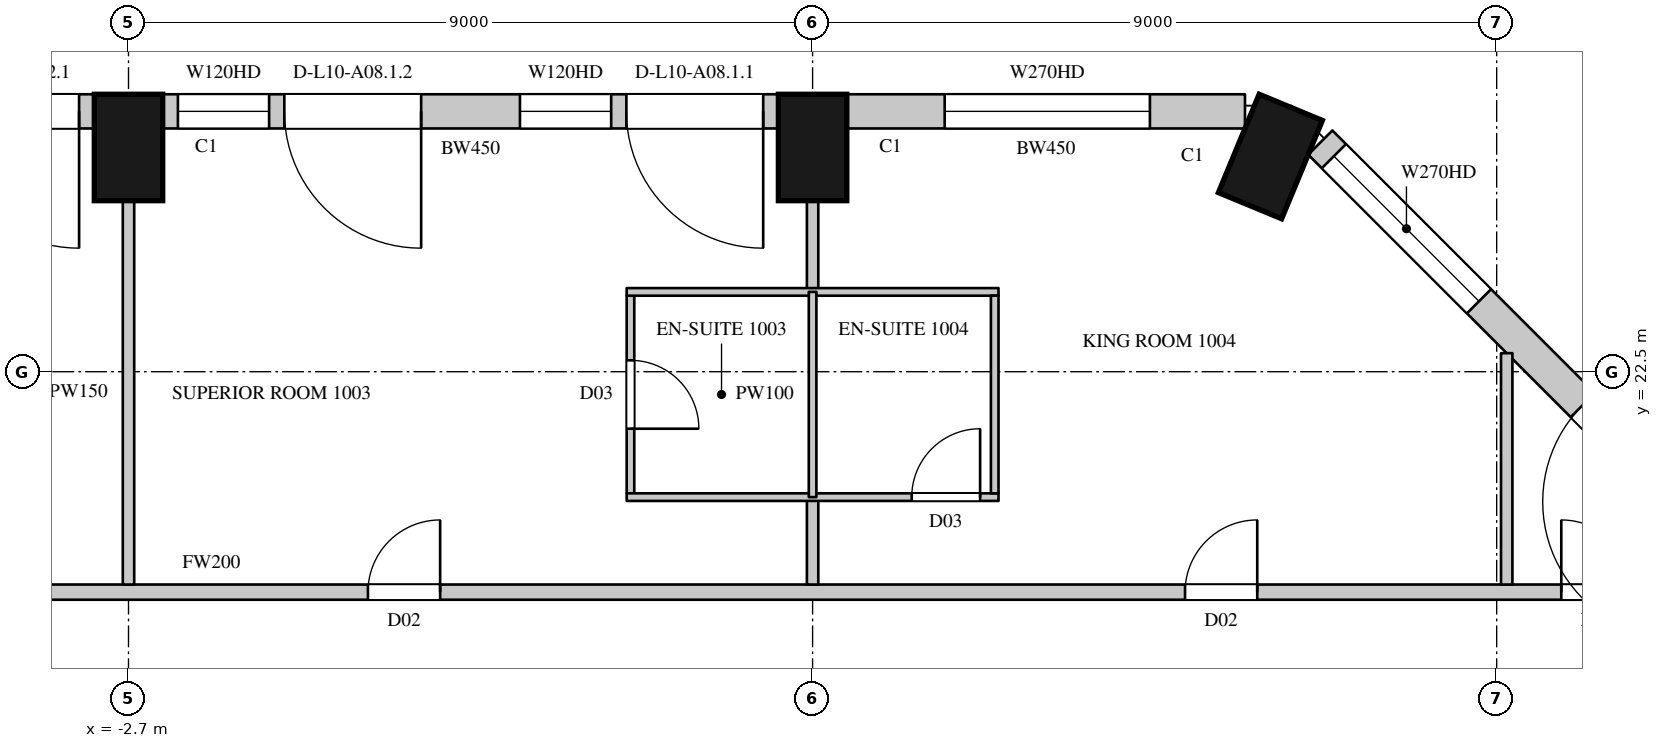
"""IFC4 building model, lengths in metres.
Left out: names, types, materials, properties, quantities, classifications, styles, units other than length and angle.
Written with IfcOpenShell. Run it as: python <this file> out.ifc"""

import sys

from ifc_helpers import new_model, si_unit, direction, frame, frame_2d, origin, origin_2d, place, context, subcontext, project, spatial, rectangle, extrude, element, fill, save


model = new_model("IFC4")
c1 = context("Model", 3, precision=1e-05, world=origin(), true_north=direction((0.0, 1.0)))
c2 = subcontext(c1, "Body", "Model", "MODEL_VIEW")
j1 = project(units=[si_unit("LENGTHUNIT", "METRE"), si_unit("PLANEANGLEUNIT", "RADIAN")], contexts=[c1])
p1 = place(None, origin())
s1 = spatial("IfcSite", under=j1, at=p1, CompositionType="ELEMENT")
p2 = place(p1, origin())
s2 = spatial("IfcBuilding", under=s1, at=p2, CompositionType="ELEMENT")
p3 = place(p2, frame((0.0, 0.0, 66.3)))
s3 = spatial("IfcBuildingStorey", under=s2, at=p3, CompositionType="ELEMENT", Elevation=66.3)
for number, where, z_axis, x_axis in (
    (1, (12.323, 25.331, 0.0), (0.0, 0.0, 1.0), (-0.924, 0.383, 0.0)),
    (2, (6.3, 25.45, 0.0), (0.0, 0.0, 1.0), (-1.0, 0.0, 0.0)),
    (3, (-2.7, 25.45, 0.0), (0.0, 0.0, 1.0), (-1.0, 0.0, 0.0)),
):
    element("IfcColumn", number, at=place(p3, frame(where, z_axis=z_axis, x_axis=x_axis)), inside=s3, PredefinedType="COLUMN", context=c2, shape_type="SweptSolid", body=[
        extrude(rectangle(XDim=0.9, YDim=1.4, at=origin_2d()), origin(), (0.0, 0.0, 1.0), 3.6),
    ])
p4 = place(p3, frame((18.229, 20.265, 0.0), z_axis=(0.0, 0.0, 1.0), x_axis=(-0.707106781187, 0.707106781187, 0.0)))
e4 = element("IfcWall", 4, at=p4, inside=s3, PredefinedType="SOLIDWALL", context=c2, shape_type="SweptSolid", body=[
    extrude(rectangle(XDim=7.424, YDim=0.45, at=frame_2d((3.712, 0.0))), origin(), (0.0, 0.0, 1.0), 3.3),
])
p5 = place(p4, frame((0.74, 0.0, 0.0)))
e5 = element("IfcOpeningElement", 5, at=p5, cuts=e4, PredefinedType="OPENING", context=c2, shape_type="SweptSolid", body=[
    extrude(rectangle(XDim=1.8, YDim=2.4, at=frame_2d((0.9, 1.2))), frame((0.0, 0.235, 0.0), z_axis=(0.0, -1.0, 0.0), x_axis=(1.0, 0.0, 0.0)), (0.0, 0.0, 1.0), 0.47),
])
p6 = place(p4, frame((4.471, 0.0, 1.05)))
e6 = element("IfcOpeningElement", 6, at=p6, cuts=e4, PredefinedType="OPENING", context=c2, shape_type="SweptSolid", body=[
    extrude(rectangle(XDim=2.7, YDim=2.0, at=frame_2d((1.35, 1.0))), frame((0.0, 0.235, 0.0), z_axis=(0.0, -1.0, 0.0), x_axis=(1.0, 0.0, 0.0)), (0.0, 0.0, 1.0), 0.47),
])
p7 = place(p3, frame((11.989, 25.925, 0.0), z_axis=(0.0, 0.0, 1.0), x_axis=(-1.0, 0.0, 0.0)))
e7 = element("IfcWall", 7, at=p7, inside=s3, PredefinedType="SOLIDWALL", context=c2, shape_type="SweptSolid", body=[
    extrude(rectangle(XDim=5.239, YDim=0.45, at=frame_2d((2.619, 0.0))), origin(), (0.0, 0.0, 1.0), 3.3),
])
p8 = place(p7, frame((1.251, 0.0, 1.05)))
e8 = element("IfcOpeningElement", 8, at=p8, cuts=e7, PredefinedType="OPENING", context=c2, shape_type="SweptSolid", body=[
    extrude(rectangle(XDim=2.7, YDim=2.0, at=frame_2d((1.35, 1.0))), frame((0.0, 0.235, 0.0), z_axis=(0.0, -1.0, 0.0), x_axis=(1.0, 0.0, 0.0)), (0.0, 0.0, 1.0), 0.47),
])
p9 = place(p3, frame((5.85, 25.925, 0.0), z_axis=(0.0, 0.0, 1.0), x_axis=(-1.0, 0.0, 0.0)))
e9 = element("IfcWall", 9, at=p9, inside=s3, PredefinedType="SOLIDWALL", context=c2, shape_type="SweptSolid", body=[
    extrude(rectangle(XDim=8.1, YDim=0.45, at=frame_2d((4.05, 0.0))), origin(), (0.0, 0.0, 1.0), 3.3),
])
p10 = place(p9, frame((0.2, 0.0, 0.0)))
e10 = element("IfcOpeningElement", 10, at=p10, cuts=e9, PredefinedType="OPENING", context=c2, shape_type="SweptSolid", body=[
    extrude(rectangle(XDim=1.8, YDim=2.4, at=frame_2d((0.9, 1.2))), frame((0.0, 0.235, 0.0), z_axis=(0.0, -1.0, 0.0), x_axis=(1.0, 0.0, 0.0)), (0.0, 0.0, 1.0), 0.47),
])
p11 = place(p9, frame((2.2, 0.0, 1.05)))
e11 = element("IfcOpeningElement", 11, at=p11, cuts=e9, PredefinedType="OPENING", context=c2, shape_type="SweptSolid", body=[
    extrude(rectangle(XDim=1.2, YDim=2.0, at=frame_2d((0.6, 1.0))), frame((0.0, 0.235, 0.0), z_axis=(0.0, -1.0, 0.0), x_axis=(1.0, 0.0, 0.0)), (0.0, 0.0, 1.0), 0.47),
])
p12 = place(p9, frame((4.7, 0.0, 0.0)))
e12 = element("IfcOpeningElement", 12, at=p12, cuts=e9, PredefinedType="OPENING", context=c2, shape_type="SweptSolid", body=[
    extrude(rectangle(XDim=1.8, YDim=2.4, at=frame_2d((0.9, 1.2))), frame((0.0, 0.235, 0.0), z_axis=(0.0, -1.0, 0.0), x_axis=(1.0, 0.0, 0.0)), (0.0, 0.0, 1.0), 0.47),
])
p13 = place(p9, frame((6.7, 0.0, 1.05)))
e13 = element("IfcOpeningElement", 13, at=p13, cuts=e9, PredefinedType="OPENING", context=c2, shape_type="SweptSolid", body=[
    extrude(rectangle(XDim=1.2, YDim=2.0, at=frame_2d((0.6, 1.0))), frame((0.0, 0.235, 0.0), z_axis=(0.0, -1.0, 0.0), x_axis=(1.0, 0.0, 0.0)), (0.0, 0.0, 1.0), 0.47),
])
p14 = place(p3, frame((-3.15, 25.925, 0.0), z_axis=(0.0, 0.0, 1.0), x_axis=(-1.0, 0.0, 0.0)))
e14 = element("IfcWall", 14, at=p14, inside=s3, PredefinedType="SOLIDWALL", context=c2, shape_type="SweptSolid", body=[
    extrude(rectangle(XDim=8.1, YDim=0.45, at=frame_2d((4.05, 0.0))), origin(), (0.0, 0.0, 1.0), 3.3),
])
p15 = place(p14, frame((0.2, 0.0, 0.0)))
e15 = element("IfcOpeningElement", 15, at=p15, cuts=e14, PredefinedType="OPENING", context=c2, shape_type="SweptSolid", body=[
    extrude(rectangle(XDim=1.8, YDim=2.4, at=frame_2d((0.9, 1.2))), frame((0.0, 0.235, 0.0), z_axis=(0.0, -1.0, 0.0), x_axis=(1.0, 0.0, 0.0)), (0.0, 0.0, 1.0), 0.47),
])
p16 = place(p14, frame((2.2, 0.0, 1.05)))
e16 = element("IfcOpeningElement", 16, at=p16, cuts=e14, PredefinedType="OPENING", context=c2, shape_type="SweptSolid", body=[
    extrude(rectangle(XDim=1.2, YDim=2.0, at=frame_2d((0.6, 1.0))), frame((0.0, 0.235, 0.0), z_axis=(0.0, -1.0, 0.0), x_axis=(1.0, 0.0, 0.0)), (0.0, 0.0, 1.0), 0.47),
])
p17 = place(p14, frame((4.7, 0.0, 0.0)))
e17 = element("IfcOpeningElement", 17, at=p17, cuts=e14, PredefinedType="OPENING", context=c2, shape_type="SweptSolid", body=[
    extrude(rectangle(XDim=1.8, YDim=2.4, at=frame_2d((0.9, 1.2))), frame((0.0, 0.235, 0.0), z_axis=(0.0, -1.0, 0.0), x_axis=(1.0, 0.0, 0.0)), (0.0, 0.0, 1.0), 0.47),
])
p18 = place(p14, frame((6.7, 0.0, 1.05)))
e18 = element("IfcOpeningElement", 18, at=p18, cuts=e14, PredefinedType="OPENING", context=c2, shape_type="SweptSolid", body=[
    extrude(rectangle(XDim=1.2, YDim=2.0, at=frame_2d((0.6, 1.0))), frame((0.0, 0.235, 0.0), z_axis=(0.0, -1.0, 0.0), x_axis=(1.0, 0.0, 0.0)), (0.0, 0.0, 1.0), 0.47),
])
p19 = place(p3, frame((16.486, 23.529, 0.0), z_axis=(0.0, 0.0, 1.0), x_axis=(-0.707022305137, 0.707191247145, 0.0)))
e19 = element("IfcWall", 19, at=p19, inside=s3, PredefinedType="SOLIDWALL", context=c2, shape_type="SweptSolid", body=[
    extrude(rectangle(XDim=1.445, YDim=0.45, at=frame_2d((0.723, 0.0))), origin(), (0.0, 0.0, 1.0), 0.6),
])
p20 = place(p3, frame((-20.7, 19.6, 0.0), z_axis=(0.0, 0.0, 1.0), x_axis=(1.0, 0.0, 0.0)))
e20 = element("IfcWall", 20, at=p20, inside=s3, PredefinedType="PARTITIONING", context=c2, shape_type="SweptSolid", body=[
    extrude(rectangle(XDim=38.184, YDim=0.2, at=frame_2d((19.092, 0.0))), origin(), (0.0, 0.0, 1.0), 3.3),
])
p21 = place(p20, frame((3.15, 0.0, 0.0)))
e21 = element("IfcOpeningElement", 21, at=p21, cuts=e20, PredefinedType="OPENING", context=c2, shape_type="SweptSolid", body=[
    extrude(rectangle(XDim=0.95, YDim=2.2, at=frame_2d((0.475, 1.1))), frame((0.0, 0.11, 0.0), z_axis=(0.0, -1.0, 0.0), x_axis=(1.0, 0.0, 0.0)), (0.0, 0.0, 1.0), 0.22),
])
p22 = place(p20, frame((13.9, 0.0, 0.0)))
e22 = element("IfcOpeningElement", 22, at=p22, cuts=e20, PredefinedType="OPENING", context=c2, shape_type="SweptSolid", body=[
    extrude(rectangle(XDim=0.95, YDim=2.2, at=frame_2d((0.475, 1.1))), frame((0.0, 0.11, 0.0), z_axis=(0.0, -1.0, 0.0), x_axis=(1.0, 0.0, 0.0)), (0.0, 0.0, 1.0), 0.22),
])
p23 = place(p20, frame((21.15, 0.0, 0.0)))
e23 = element("IfcOpeningElement", 23, at=p23, cuts=e20, PredefinedType="OPENING", context=c2, shape_type="SweptSolid", body=[
    extrude(rectangle(XDim=0.95, YDim=2.2, at=frame_2d((0.475, 1.1))), frame((0.0, 0.11, 0.0), z_axis=(0.0, -1.0, 0.0), x_axis=(1.0, 0.0, 0.0)), (0.0, 0.0, 1.0), 0.22),
])
p24 = place(p20, frame((31.9, 0.0, 0.0)))
e24 = element("IfcOpeningElement", 24, at=p24, cuts=e20, PredefinedType="OPENING", context=c2, shape_type="SweptSolid", body=[
    extrude(rectangle(XDim=0.95, YDim=2.2, at=frame_2d((0.475, 1.1))), frame((0.0, 0.11, 0.0), z_axis=(0.0, -1.0, 0.0), x_axis=(1.0, 0.0, 0.0)), (0.0, 0.0, 1.0), 0.22),
])
p25 = place(p20, frame((36.85, 0.0, 0.0)))
e25 = element("IfcOpeningElement", 25, at=p25, cuts=e20, PredefinedType="OPENING", context=c2, shape_type="SweptSolid", body=[
    extrude(rectangle(XDim=0.95, YDim=2.2, at=frame_2d((0.475, 1.1))), frame((0.0, 0.11, 0.0), z_axis=(0.0, -1.0, 0.0), x_axis=(1.0, 0.0, 0.0)), (0.0, 0.0, 1.0), 0.22),
])
p26 = place(p3, frame((-2.7, 19.7, 0.0), z_axis=(0.0, 0.0, 1.0), x_axis=(0.0, 1.0, 0.0)))
e26 = element("IfcWall", 26, at=p26, inside=s3, PredefinedType="PARTITIONING", context=c2, shape_type="SweptSolid", body=[
    extrude(rectangle(XDim=5.05, YDim=0.15, at=frame_2d((2.525, 0.0))), origin(), (0.0, 0.0, 1.0), 2.75),
])
p27 = place(p3, frame((6.3, 19.7, 0.0), z_axis=(0.0, 0.0, 1.0), x_axis=(0.0, 1.0, 0.0)))
e27 = element("IfcWall", 27, at=p27, inside=s3, PredefinedType="PARTITIONING", context=c2, shape_type="SweptSolid", body=[
    extrude(rectangle(XDim=1.15, YDim=0.15, at=frame_2d((0.575, 0.0))), origin(), (0.0, 0.0, 1.0), 2.75),
])
p28 = place(p3, frame((6.3, 23.55, 0.0), z_axis=(0.0, 0.0, 1.0), x_axis=(0.0, 1.0, 0.0)))
e28 = element("IfcWall", 28, at=p28, inside=s3, PredefinedType="PARTITIONING", context=c2, shape_type="SweptSolid", body=[
    extrude(rectangle(XDim=1.2, YDim=0.15, at=frame_2d((0.6, 0.0))), origin(), (0.0, 0.0, 1.0), 2.75),
])
p29 = place(p3, frame((15.432, 19.7, 0.0), z_axis=(0.0, 0.0, 1.0), x_axis=(0.0, 1.0, 0.0)))
e29 = element("IfcWall", 29, at=p29, inside=s3, PredefinedType="PARTITIONING", context=c2, shape_type="SweptSolid", body=[
    extrude(rectangle(XDim=3.044, YDim=0.15, at=frame_2d((1.522, 0.0))), origin(), (0.0, 0.0, 1.0), 3.3),
])
p30 = place(p3, frame((3.904, 20.9, 0.0), z_axis=(0.0, 0.0, 1.0), x_axis=(0.0, 1.0, 0.0)))
e30 = element("IfcWall", 30, at=p30, inside=s3, PredefinedType="PARTITIONING", context=c2, shape_type="SweptSolid", body=[
    extrude(rectangle(XDim=2.6, YDim=0.1, at=frame_2d((1.3, 0.0))), origin(), (0.0, 0.0, 1.0), 3.3),
])
p31 = place(p30, frame((0.85, 0.0, 0.0)))
e31 = element("IfcOpeningElement", 31, at=p31, cuts=e30, PredefinedType="OPENING", context=c2, shape_type="SweptSolid", body=[
    extrude(rectangle(XDim=0.9, YDim=2.2, at=frame_2d((0.45, 1.1))), frame((0.0, 0.06, 0.0), z_axis=(0.0, -1.0, 0.0), x_axis=(1.0, 0.0, 0.0)), (0.0, 0.0, 1.0), 0.12),
])
p32 = place(p3, frame((3.854, 20.85, 0.0), z_axis=(0.0, 0.0, 1.0), x_axis=(1.0, 0.0, 0.0)))
e32 = element("IfcWall", 32, at=p32, inside=s3, PredefinedType="PARTITIONING", context=c2, shape_type="SweptSolid", body=[
    extrude(rectangle(XDim=4.892, YDim=0.1, at=frame_2d((2.446, 0.0))), origin(), (0.0, 0.0, 1.0), 3.3),
])
p33 = place(p32, frame((3.75, 0.0, 0.0)))
e33 = element("IfcOpeningElement", 33, at=p33, cuts=e32, PredefinedType="OPENING", context=c2, shape_type="SweptSolid", body=[
    extrude(rectangle(XDim=0.9, YDim=2.2, at=frame_2d((0.45, 1.1))), frame((0.0, 0.06, 0.0), z_axis=(0.0, -1.0, 0.0), x_axis=(1.0, 0.0, 0.0)), (0.0, 0.0, 1.0), 0.12),
])
p34 = place(p3, frame((3.854, 23.55, 0.0), z_axis=(0.0, 0.0, 1.0), x_axis=(1.0, 0.0, 0.0)))
e34 = element("IfcWall", 34, at=p34, inside=s3, PredefinedType="PARTITIONING", context=c2, shape_type="SweptSolid", body=[
    extrude(rectangle(XDim=4.892, YDim=0.1, at=frame_2d((2.446, 0.0))), origin(), (0.0, 0.0, 1.0), 3.3),
])
p35 = place(p3, frame((6.3, 20.85, 0.0), z_axis=(0.0, 0.0, 1.0), x_axis=(0.0, 1.0, 0.0)))
e35 = element("IfcWall", 35, at=p35, inside=s3, PredefinedType="PARTITIONING", context=c2, shape_type="SweptSolid", body=[
    extrude(rectangle(XDim=2.7, YDim=0.1, at=frame_2d((1.35, 0.0))), origin(), (0.0, 0.0, 1.0), 2.75),
])
p36 = place(p3, frame((8.696, 20.9, 0.0), z_axis=(0.0, 0.0, 1.0), x_axis=(0.0, 1.0, 0.0)))
e36 = element("IfcWall", 36, at=p36, inside=s3, PredefinedType="PARTITIONING", context=c2, shape_type="SweptSolid", body=[
    extrude(rectangle(XDim=2.6, YDim=0.1, at=frame_2d((1.3, 0.0))), origin(), (0.0, 0.0, 1.0), 3.3),
])
p37 = place(p5, origin())
e37 = element("IfcDoor", 37, at=p37, inside=s3, OperationType="SLIDING_TO_LEFT", PredefinedType="DOOR", context=c2, shape_type="SweptSolid", body=[
    extrude(rectangle(XDim=1.8, YDim=2.4, at=frame_2d((0.9, 1.2))), frame((0.0, 0.13, 0.0), z_axis=(0.0, -1.0, 0.0), x_axis=(1.0, 0.0, 0.0)), (0.0, 0.0, 1.0), 0.05),
])
fill(e5, e37)
p38 = place(p6, origin())
e38 = element("IfcWindow", 38, at=p38, inside=s3, PartitioningType="SINGLE_PANEL", PredefinedType="WINDOW", context=c2, shape_type="SweptSolid", body=[
    extrude(rectangle(XDim=2.7, YDim=2.0, at=frame_2d((1.35, 1.0))), frame((0.0, 0.135, 0.0), z_axis=(0.0, -1.0, 0.0), x_axis=(1.0, 0.0, 0.0)), (0.0, 0.0, 1.0), 0.06),
])
fill(e6, e38)
p39 = place(p8, origin())
e39 = element("IfcWindow", 39, at=p39, inside=s3, PartitioningType="SINGLE_PANEL", PredefinedType="WINDOW", context=c2, shape_type="SweptSolid", body=[
    extrude(rectangle(XDim=2.7, YDim=2.0, at=frame_2d((1.35, 1.0))), frame((0.0, 0.135, 0.0), z_axis=(0.0, -1.0, 0.0), x_axis=(1.0, 0.0, 0.0)), (0.0, 0.0, 1.0), 0.06),
])
fill(e8, e39)
p40 = place(p10, origin())
e40 = element("IfcDoor", 40, at=p40, inside=s3, OperationType="SLIDING_TO_LEFT", PredefinedType="DOOR", context=c2, shape_type="SweptSolid", body=[
    extrude(rectangle(XDim=1.8, YDim=2.4, at=frame_2d((0.9, 1.2))), frame((0.0, 0.13, 0.0), z_axis=(0.0, -1.0, 0.0), x_axis=(1.0, 0.0, 0.0)), (0.0, 0.0, 1.0), 0.05),
])
fill(e10, e40)
p41 = place(p11, origin())
e41 = element("IfcWindow", 41, at=p41, inside=s3, PartitioningType="SINGLE_PANEL", PredefinedType="WINDOW", context=c2, shape_type="SweptSolid", body=[
    extrude(rectangle(XDim=1.2, YDim=2.0, at=frame_2d((0.6, 1.0))), frame((0.0, 0.135, 0.0), z_axis=(0.0, -1.0, 0.0), x_axis=(1.0, 0.0, 0.0)), (0.0, 0.0, 1.0), 0.06),
])
fill(e11, e41)
p42 = place(p12, origin())
e42 = element("IfcDoor", 42, at=p42, inside=s3, OperationType="SLIDING_TO_LEFT", PredefinedType="DOOR", context=c2, shape_type="SweptSolid", body=[
    extrude(rectangle(XDim=1.8, YDim=2.4, at=frame_2d((0.9, 1.2))), frame((0.0, 0.13, 0.0), z_axis=(0.0, -1.0, 0.0), x_axis=(1.0, 0.0, 0.0)), (0.0, 0.0, 1.0), 0.05),
])
fill(e12, e42)
p43 = place(p13, origin())
e43 = element("IfcWindow", 43, at=p43, inside=s3, PartitioningType="SINGLE_PANEL", PredefinedType="WINDOW", context=c2, shape_type="SweptSolid", body=[
    extrude(rectangle(XDim=1.2, YDim=2.0, at=frame_2d((0.6, 1.0))), frame((0.0, 0.135, 0.0), z_axis=(0.0, -1.0, 0.0), x_axis=(1.0, 0.0, 0.0)), (0.0, 0.0, 1.0), 0.06),
])
fill(e13, e43)
p44 = place(p15, origin())
e44 = element("IfcDoor", 44, at=p44, inside=s3, OperationType="SLIDING_TO_LEFT", PredefinedType="DOOR", context=c2, shape_type="SweptSolid", body=[
    extrude(rectangle(XDim=1.8, YDim=2.4, at=frame_2d((0.9, 1.2))), frame((0.0, 0.13, 0.0), z_axis=(0.0, -1.0, 0.0), x_axis=(1.0, 0.0, 0.0)), (0.0, 0.0, 1.0), 0.05),
])
fill(e15, e44)
p45 = place(p23, origin())
e45 = element("IfcDoor", 45, at=p45, inside=s3, OperationType="SINGLE_SWING_RIGHT", PredefinedType="DOOR", context=c2, shape_type="SweptSolid", body=[
    extrude(rectangle(XDim=0.95, YDim=2.2, at=frame_2d((0.475, 1.1))), frame((0.0, 0.025, 0.0), z_axis=(0.0, -1.0, 0.0), x_axis=(1.0, 0.0, 0.0)), (0.0, 0.0, 1.0), 0.05),
])
fill(e23, e45)
p46 = place(p31, origin())
e46 = element("IfcDoor", 46, at=p46, inside=s3, OperationType="SINGLE_SWING_RIGHT", PredefinedType="DOOR", context=c2, shape_type="SweptSolid", body=[
    extrude(rectangle(XDim=0.9, YDim=2.2, at=frame_2d((0.45, 1.1))), frame((0.0, 0.025, 0.0), z_axis=(0.0, -1.0, 0.0), x_axis=(1.0, 0.0, 0.0)), (0.0, 0.0, 1.0), 0.05),
])
fill(e31, e46)
p47 = place(p24, origin())
e47 = element("IfcDoor", 47, at=p47, inside=s3, OperationType="SINGLE_SWING_RIGHT", PredefinedType="DOOR", context=c2, shape_type="SweptSolid", body=[
    extrude(rectangle(XDim=0.95, YDim=2.2, at=frame_2d((0.475, 1.1))), frame((0.0, 0.025, 0.0), z_axis=(0.0, -1.0, 0.0), x_axis=(1.0, 0.0, 0.0)), (0.0, 0.0, 1.0), 0.05),
])
fill(e24, e47)
p48 = place(p33, origin())
e48 = element("IfcDoor", 48, at=p48, inside=s3, OperationType="SINGLE_SWING_RIGHT", PredefinedType="DOOR", context=c2, shape_type="SweptSolid", body=[
    extrude(rectangle(XDim=0.9, YDim=2.2, at=frame_2d((0.45, 1.1))), frame((0.0, 0.025, 0.0), z_axis=(0.0, -1.0, 0.0), x_axis=(1.0, 0.0, 0.0)), (0.0, 0.0, 1.0), 0.05),
])
fill(e33, e48)
p49 = place(p25, origin())
e49 = element("IfcDoor", 49, at=p49, inside=s3, OperationType="SINGLE_SWING_LEFT", PredefinedType="DOOR", context=c2, shape_type="SweptSolid", body=[
    extrude(rectangle(XDim=0.95, YDim=2.2, at=frame_2d((0.475, 1.1))), frame((0.0, 0.025, 0.0), z_axis=(0.0, -1.0, 0.0), x_axis=(1.0, 0.0, 0.0)), (0.0, 0.0, 1.0), 0.05),
])
fill(e25, e49)
save(model, sys.argv[1])
